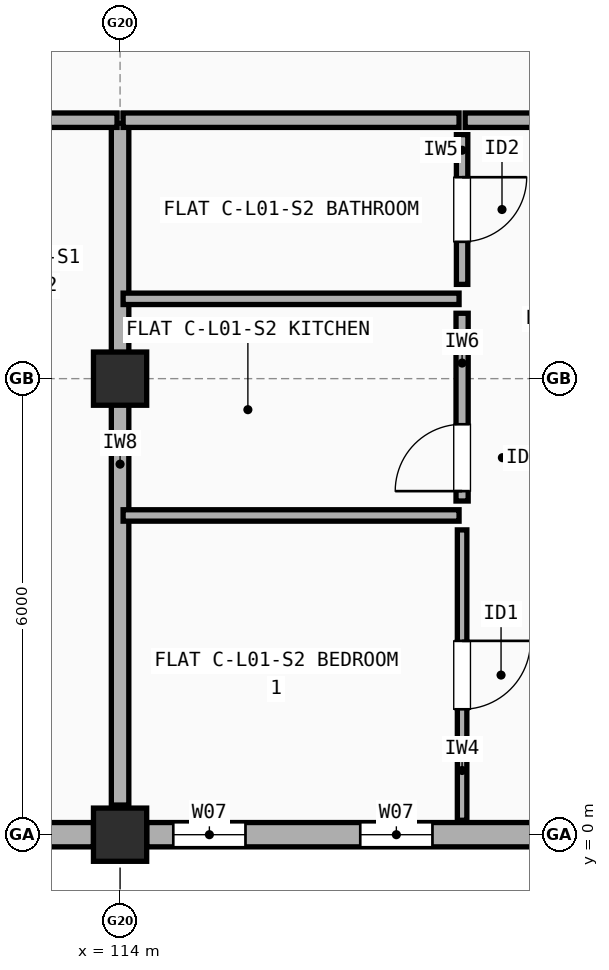
"""IFC4 building model, lengths in metres.
Left out: names, types, materials, properties, quantities, classifications, styles, units other than length and angle.
Written with IfcOpenShell. Run it as: python <this file> out.ifc"""

import sys

from ifc_helpers import new_model, si_unit, direction, frame, frame_2d, origin, origin_2d, place, context, subcontext, project, spatial, rectangle, extrude, element, fill, save


model = new_model("IFC4")
c1 = context("Model", 3, precision=1e-05, world=origin(), true_north=direction((0.0, 1.0)))
c2 = subcontext(c1, "Body", "Model", "MODEL_VIEW")
j1 = project(units=[si_unit("LENGTHUNIT", "METRE"), si_unit("PLANEANGLEUNIT", "RADIAN")], contexts=[c1])
p1 = place(None, origin())
s1 = spatial("IfcSite", under=j1, at=p1, CompositionType="ELEMENT")
p2 = place(p1, origin())
s2 = spatial("IfcBuilding", under=s1, at=p2, CompositionType="ELEMENT")
p3 = place(p2, frame((0.0, 0.0, 4.5)))
s3 = spatial("IfcBuildingStorey", under=s2, at=p3, CompositionType="ELEMENT", Elevation=4.5)
for number, where, z_axis, x_axis in (
    (1, (114.0, 0.0, 0.0), (0.0, 0.0, 1.0), (1.0, 0.0, 0.0)),
    (2, (114.0, 6.0, 0.0), (0.0, 0.0, 1.0), (1.0, 0.0, 0.0)),
):
    element("IfcColumn", number, at=place(p3, frame(where, z_axis=z_axis, x_axis=x_axis)), inside=s3, PredefinedType="COLUMN", context=c2, shape_type="SweptSolid", body=[
        extrude(rectangle(XDim=0.7, YDim=0.7, at=origin_2d()), origin(), (0.0, 0.0, 1.0), 2.945),
    ])
p4 = place(p3, frame((108.35, 0.0, 0.0), z_axis=(0.0, 0.0, 1.0), x_axis=(1.0, 0.0, 0.0)))
e3 = element("IfcWall", 3, at=p4, inside=s3, PredefinedType="STANDARD", context=c2, shape_type="SweptSolid", body=[
    extrude(rectangle(XDim=5.3, YDim=0.32, at=frame_2d((2.65, 0.0))), origin(), (0.0, 0.0, 1.0), 2.427),
])
p5 = place(p4, frame((0.88, 0.0, 0.9)))
e4 = element("IfcOpeningElement", 4, at=p5, cuts=e3, PredefinedType="OPENING", context=c2, shape_type="SweptSolid", body=[
    extrude(rectangle(XDim=0.85, YDim=1.25, at=frame_2d((0.425, 0.625))), frame((0.0, 0.17, 0.0), z_axis=(0.0, -1.0, 0.0), x_axis=(1.0, 0.0, 0.0)), (0.0, 0.0, 1.0), 0.34),
])
p6 = place(p4, frame((3.545, 0.0, 0.9)))
e5 = element("IfcOpeningElement", 5, at=p6, cuts=e3, PredefinedType="OPENING", context=c2, shape_type="SweptSolid", body=[
    extrude(rectangle(XDim=0.9, YDim=1.3, at=frame_2d((0.45, 0.65))), frame((0.0, 0.17, 0.0), z_axis=(0.0, -1.0, 0.0), x_axis=(1.0, 0.0, 0.0)), (0.0, 0.0, 1.0), 0.34),
])
p7 = place(p3, frame((114.35, 0.0, 0.0), z_axis=(0.0, 0.0, 1.0), x_axis=(1.0, 0.0, 0.0)))
e6 = element("IfcWall", 6, at=p7, inside=s3, PredefinedType="STANDARD", context=c2, shape_type="SweptSolid", body=[
    extrude(rectangle(XDim=5.3, YDim=0.32, at=frame_2d((2.65, 0.0))), origin(), (0.0, 0.0, 1.0), 2.427),
])
p8 = place(p7, frame((0.35, 0.0, 0.9)))
e7 = element("IfcOpeningElement", 7, at=p8, cuts=e6, PredefinedType="OPENING", context=c2, shape_type="SweptSolid", body=[
    extrude(rectangle(XDim=0.95, YDim=1.35, at=frame_2d((0.475, 0.675))), frame((0.0, 0.17, 0.0), z_axis=(0.0, -1.0, 0.0), x_axis=(1.0, 0.0, 0.0)), (0.0, 0.0, 1.0), 0.34),
])
p9 = place(p7, frame((2.81, 0.0, 0.9)))
e8 = element("IfcOpeningElement", 8, at=p9, cuts=e6, PredefinedType="OPENING", context=c2, shape_type="SweptSolid", body=[
    extrude(rectangle(XDim=0.95, YDim=1.35, at=frame_2d((0.475, 0.675))), frame((0.0, 0.17, 0.0), z_axis=(0.0, -1.0, 0.0), x_axis=(1.0, 0.0, 0.0)), (0.0, 0.0, 1.0), 0.34),
])
p10 = place(p3, frame((114.0, 0.39, 0.0), z_axis=(0.0, 0.0, 1.0), x_axis=(0.0, 1.0, 0.0)))
e9 = element("IfcWall", 9, at=p10, inside=s3, PredefinedType="SOLIDWALL", context=c2, shape_type="SweptSolid", body=[
    extrude(rectangle(XDim=8.97, YDim=0.23, at=frame_2d((4.485, 0.0))), origin(), (0.0, 0.0, 1.0), 2.327),
])
p11 = place(p3, frame((111.04, 9.4, 0.0), z_axis=(0.0, 0.0, 1.0), x_axis=(1.0, 0.0, 0.0)))
e10 = element("IfcWall", 10, at=p11, inside=s3, PredefinedType="SOLIDWALL", context=c2, shape_type="SweptSolid", body=[
    extrude(rectangle(XDim=2.92, YDim=0.19, at=frame_2d((1.46, 0.0))), origin(), (0.0, 0.0, 1.0), 2.327),
])
p12 = place(p3, frame((114.04, 9.4, 0.0), z_axis=(0.0, 0.0, 1.0), x_axis=(1.0, 0.0, 0.0)))
e11 = element("IfcWall", 11, at=p12, inside=s3, PredefinedType="SOLIDWALL", context=c2, shape_type="SweptSolid", body=[
    extrude(rectangle(XDim=4.42, YDim=0.19, at=frame_2d((2.21, 0.0))), origin(), (0.0, 0.0, 1.0), 2.327),
])
p13 = place(p3, frame((118.54, 9.4, 0.0), z_axis=(0.0, 0.0, 1.0), x_axis=(1.0, 0.0, 0.0)))
e12 = element("IfcWall", 12, at=p13, inside=s3, PredefinedType="SOLIDWALL", context=c2, shape_type="SweptSolid", body=[
    extrude(rectangle(XDim=4.42, YDim=0.19, at=frame_2d((2.21, 0.0))), origin(), (0.0, 0.0, 1.0), 2.327),
])
p14 = place(p13, frame((1.685, 0.0, 0.0)))
e13 = element("IfcOpeningElement", 13, at=p14, cuts=e12, PredefinedType="OPENING", context=c2, shape_type="SweptSolid", body=[
    extrude(rectangle(XDim=1.05, YDim=2.15, at=frame_2d((0.525, 1.075))), frame((0.0, 0.105, 0.0), z_axis=(0.0, -1.0, 0.0), x_axis=(1.0, 0.0, 0.0)), (0.0, 0.0, 1.0), 0.21),
])
p15 = place(p3, frame((118.5, 0.19, 0.0), z_axis=(0.0, 0.0, 1.0), x_axis=(0.0, 1.0, 0.0)))
e14 = element("IfcWall", 14, at=p15, inside=s3, PredefinedType="PARTITIONING", context=c2, shape_type="SweptSolid", body=[
    extrude(rectangle(XDim=3.82, YDim=0.125, at=frame_2d((1.91, 0.0))), origin(), (0.0, 0.0, 1.0), 2.945),
])
p16 = place(p15, frame((1.46, 0.0, 0.0)))
e15 = element("IfcOpeningElement", 15, at=p16, cuts=e14, PredefinedType="OPENING", context=c2, shape_type="SweptSolid", body=[
    extrude(rectangle(XDim=0.9, YDim=2.1, at=frame_2d((0.45, 1.05))), frame((0.0, 0.073, 0.0), z_axis=(0.0, -1.0, 0.0), x_axis=(1.0, 0.0, 0.0)), (0.0, 0.0, 1.0), 0.145),
])
p17 = place(p3, frame((118.5, 4.39, 0.0), z_axis=(0.0, 0.0, 1.0), x_axis=(0.0, 1.0, 0.0)))
e16 = element("IfcWall", 16, at=p17, inside=s3, PredefinedType="PLUMBINGWALL", context=c2, shape_type="SweptSolid", body=[
    extrude(rectangle(XDim=2.47, YDim=0.16, at=frame_2d((1.235, 0.0))), origin(), (0.0, 0.0, 1.0), 2.427),
])
p18 = place(p17, frame((0.13, 0.0, 0.0)))
e17 = element("IfcOpeningElement", 17, at=p18, cuts=e16, PredefinedType="OPENING", context=c2, shape_type="SweptSolid", body=[
    extrude(rectangle(XDim=0.88, YDim=2.1, at=frame_2d((0.44, 1.05))), frame((0.0, 0.09, 0.0), z_axis=(0.0, -1.0, 0.0), x_axis=(1.0, 0.0, 0.0)), (0.0, 0.0, 1.0), 0.18),
])
p19 = place(p3, frame((118.5, 7.24, 0.0), z_axis=(0.0, 0.0, 1.0), x_axis=(0.0, 1.0, 0.0)))
e18 = element("IfcWall", 18, at=p19, inside=s3, PredefinedType="PARTITIONING", context=c2, shape_type="SweptSolid", body=[
    extrude(rectangle(XDim=1.97, YDim=0.15, at=frame_2d((0.985, 0.0))), origin(), (0.0, 0.0, 1.0), 2.945),
])
p20 = place(p19, frame((0.56, 0.0, 0.0)))
e19 = element("IfcOpeningElement", 19, at=p20, cuts=e18, PredefinedType="OPENING", context=c2, shape_type="SweptSolid", body=[
    extrude(rectangle(XDim=0.85, YDim=2.1, at=frame_2d((0.425, 1.05))), frame((0.0, 0.085, 0.0), z_axis=(0.0, -1.0, 0.0), x_axis=(1.0, 0.0, 0.0)), (0.0, 0.0, 1.0), 0.17),
])
for number, where, z_axis, x_axis in (
    (20, (114.04, 4.2, 0.0), (0.0, 0.0, 1.0), (1.0, 0.0, 0.0)),
    (21, (114.04, 7.05, 0.0), (0.0, 0.0, 1.0), (1.0, 0.0, 0.0)),
):
    element("IfcWall", number, at=place(p3, frame(where, z_axis=z_axis, x_axis=x_axis)), inside=s3, PredefinedType="PARTITIONING", context=c2, shape_type="SweptSolid", body=[
        extrude(rectangle(XDim=4.42, YDim=0.15, at=frame_2d((2.21, 0.0))), origin(), (0.0, 0.0, 1.0), 2.327),
    ])
p21 = place(p8, origin())
e22 = element("IfcWindow", 22, at=p21, inside=s3, PartitioningType="SINGLE_PANEL", PredefinedType="WINDOW", context=c2, shape_type="SweptSolid", body=[
    extrude(rectangle(XDim=0.95, YDim=1.35, at=frame_2d((0.475, 0.675))), frame((0.0, 0.03, 0.0), z_axis=(0.0, -1.0, 0.0), x_axis=(1.0, 0.0, 0.0)), (0.0, 0.0, 1.0), 0.06),
])
fill(e7, e22)
p22 = place(p9, origin())
e23 = element("IfcWindow", 23, at=p22, inside=s3, PartitioningType="SINGLE_PANEL", PredefinedType="WINDOW", context=c2, shape_type="SweptSolid", body=[
    extrude(rectangle(XDim=0.95, YDim=1.35, at=frame_2d((0.475, 0.675))), frame((0.0, 0.03, 0.0), z_axis=(0.0, -1.0, 0.0), x_axis=(1.0, 0.0, 0.0)), (0.0, 0.0, 1.0), 0.06),
])
fill(e8, e23)
p23 = place(p16, origin())
e24 = element("IfcDoor", 24, at=p23, inside=s3, OperationType="SINGLE_SWING_RIGHT", PredefinedType="DOOR", context=c2, shape_type="SweptSolid", body=[
    extrude(rectangle(XDim=0.9, YDim=2.1, at=frame_2d((0.45, 1.05))), frame((0.0, 0.025, 0.0), z_axis=(0.0, -1.0, 0.0), x_axis=(1.0, 0.0, 0.0)), (0.0, 0.0, 1.0), 0.05),
])
fill(e15, e24)
p24 = place(p18, origin())
e25 = element("IfcDoor", 25, at=p24, inside=s3, OperationType="SINGLE_SWING_LEFT", PredefinedType="DOOR", context=c2, shape_type="SweptSolid", body=[
    extrude(rectangle(XDim=0.88, YDim=2.1, at=frame_2d((0.44, 1.05))), frame((0.0, 0.025, 0.0), z_axis=(0.0, -1.0, 0.0), x_axis=(1.0, 0.0, 0.0)), (0.0, 0.0, 1.0), 0.05),
])
fill(e17, e25)
p25 = place(p20, origin())
e26 = element("IfcDoor", 26, at=p25, inside=s3, OperationType="SINGLE_SWING_RIGHT", PredefinedType="DOOR", context=c2, shape_type="SweptSolid", body=[
    extrude(rectangle(XDim=0.85, YDim=2.1, at=frame_2d((0.425, 1.05))), frame((0.0, 0.025, 0.0), z_axis=(0.0, -1.0, 0.0), x_axis=(1.0, 0.0, 0.0)), (0.0, 0.0, 1.0), 0.05),
])
fill(e19, e26)
save(model, sys.argv[1])
